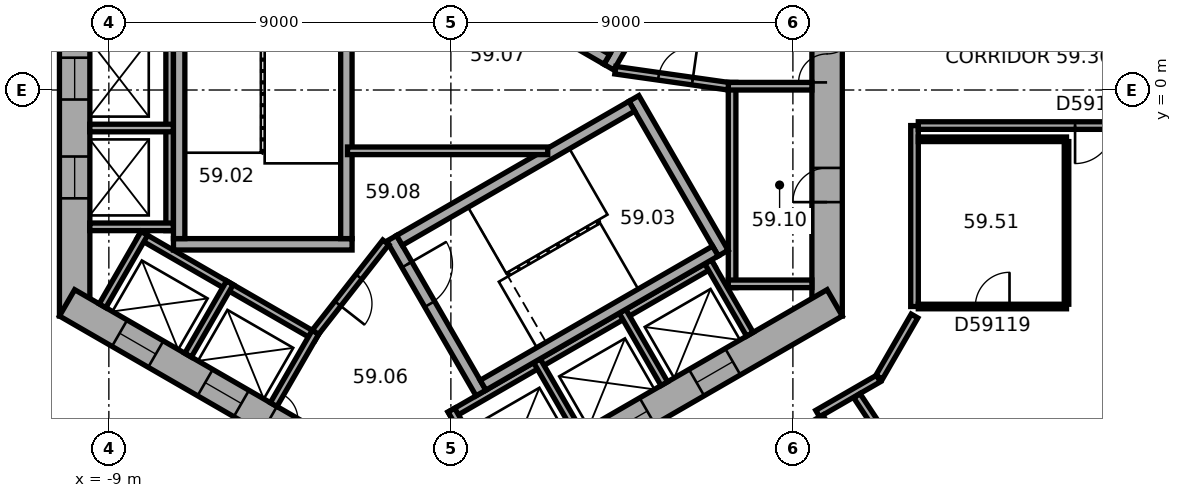
"""IFC4 building model, lengths in metres.
Left out: names, types, materials, properties, quantities, classifications, styles, units other than length and angle.
Written with IfcOpenShell. Run it as: python <this file> out.ifc"""

import sys

from ifc_helpers import new_model, si_unit, direction, frame, frame_2d, origin, place, context, subcontext, project, spatial, rectangle, extrude, element, fill, save


model = new_model("IFC4")
c1 = context("Model", 3, precision=1e-05, world=origin(), true_north=direction((0.0, 1.0)))
c2 = subcontext(c1, "Body", "Model", "MODEL_VIEW")
j1 = project(units=[si_unit("LENGTHUNIT", "METRE"), si_unit("PLANEANGLEUNIT", "RADIAN")], contexts=[c1])
p1 = place(None, origin())
s1 = spatial("IfcSite", under=j1, at=p1, CompositionType="ELEMENT")
p2 = place(p1, origin())
s2 = spatial("IfcBuilding", under=s1, at=p2, CompositionType="ELEMENT")
p3 = place(p2, frame((0.0, 0.0, 240.2)))
s3 = spatial("IfcBuildingStorey", under=s2, at=p3, CompositionType="ELEMENT", Elevation=240.2)
p4 = place(p3, frame((9.9, -5.947, 0.0), z_axis=(0.0, 0.0, 1.0), x_axis=(0.0, 1.0, 0.0)))
e1 = element("IfcWall", 1, at=p4, inside=s3, PredefinedType="SHEAR", context=c2, shape_type="SweptSolid", body=[
    extrude(rectangle(XDim=11.894, YDim=0.8, at=frame_2d((5.947, 0.0))), origin(), (0.0, 0.0, 1.0), 3.7),
])
p5 = place(p4, frame((6.147, 0.0, 0.0)))
e2 = element("IfcOpeningElement", 2, at=p5, cuts=e1, PredefinedType="OPENING", context=c2, shape_type="SweptSolid", body=[
    extrude(rectangle(XDim=1.5, YDim=2.1, at=frame_2d((0.75, 1.05))), frame((0.0, 0.41, 0.0), z_axis=(0.0, -1.0, 0.0), x_axis=(1.0, 0.0, 0.0)), (0.0, 0.0, 1.0), 0.82),
])
p6 = place(p4, frame((2.997, 0.0, 0.0)))
e3 = element("IfcOpeningElement", 3, at=p6, cuts=e1, PredefinedType="OPENING", context=c2, shape_type="SweptSolid", body=[
    extrude(rectangle(XDim=0.9, YDim=2.1, at=frame_2d((0.45, 1.05))), frame((0.0, 0.41, 0.0), z_axis=(0.0, -1.0, 0.0), x_axis=(1.0, 0.0, 0.0)), (0.0, 0.0, 1.0), 0.82),
])
p7 = place(p3, frame((-9.9, 5.947, 0.0), z_axis=(0.0, 0.0, 1.0), x_axis=(0.0, -1.0, 0.0)))
e4 = element("IfcWall", 4, at=p7, inside=s3, PredefinedType="SHEAR", context=c2, shape_type="SweptSolid", body=[
    extrude(rectangle(XDim=11.894, YDim=0.8, at=frame_2d((5.947, 0.0))), origin(), (0.0, 0.0, 1.0), 3.7),
])
p8 = place(p7, frame((5.097, 0.0, 0.0)))
e5 = element("IfcOpeningElement", 5, at=p8, cuts=e4, PredefinedType="OPENING", context=c2, shape_type="SweptSolid", body=[
    extrude(rectangle(XDim=1.1, YDim=2.1, at=frame_2d((0.55, 1.05))), frame((0.0, 0.41, 0.0), z_axis=(0.0, -1.0, 0.0), x_axis=(1.0, 0.0, 0.0)), (0.0, 0.0, 1.0), 0.82),
])
p9 = place(p7, frame((7.697, 0.0, 0.0)))
e6 = element("IfcOpeningElement", 6, at=p9, cuts=e4, PredefinedType="OPENING", context=c2, shape_type="SweptSolid", body=[
    extrude(rectangle(XDim=1.1, YDim=2.1, at=frame_2d((0.55, 1.05))), frame((0.0, 0.41, 0.0), z_axis=(0.0, -1.0, 0.0), x_axis=(1.0, 0.0, 0.0)), (0.0, 0.0, 1.0), 0.82),
])
p10 = place(p3, frame((-10.1, -5.6, 0.0), z_axis=(0.0, 0.0, 1.0), x_axis=(0.866023897231, -0.500002609418, 0.0)))
e7 = element("IfcWall", 7, at=p10, inside=s3, PredefinedType="SHEAR", context=c2, shape_type="SweptSolid", body=[
    extrude(rectangle(XDim=11.894, YDim=0.8, at=frame_2d((5.947, 0.0))), origin(), (0.0, 0.0, 1.0), 3.7),
])
p11 = place(p10, frame((6.147, 0.0, 0.0)))
e8 = element("IfcOpeningElement", 8, at=p11, cuts=e7, PredefinedType="OPENING", context=c2, shape_type="SweptSolid", body=[
    extrude(rectangle(XDim=1.5, YDim=2.1, at=frame_2d((0.75, 1.05))), frame((0.0, 0.41, 0.0), z_axis=(0.0, -1.0, 0.0), x_axis=(1.0, 0.0, 0.0)), (0.0, 0.0, 1.0), 0.82),
])
p12 = place(p10, frame((1.597, 0.0, 0.0)))
e9 = element("IfcOpeningElement", 9, at=p12, cuts=e7, PredefinedType="OPENING", context=c2, shape_type="SweptSolid", body=[
    extrude(rectangle(XDim=1.1, YDim=2.1, at=frame_2d((0.55, 1.05))), frame((0.0, 0.41, 0.0), z_axis=(0.0, -1.0, 0.0), x_axis=(1.0, 0.0, 0.0)), (0.0, 0.0, 1.0), 0.82),
])
p13 = place(p10, frame((4.197, 0.0, 0.0)))
e10 = element("IfcOpeningElement", 10, at=p13, cuts=e7, PredefinedType="OPENING", context=c2, shape_type="SweptSolid", body=[
    extrude(rectangle(XDim=1.1, YDim=2.1, at=frame_2d((0.55, 1.05))), frame((0.0, 0.41, 0.0), z_axis=(0.0, -1.0, 0.0), x_axis=(1.0, 0.0, 0.0)), (0.0, 0.0, 1.0), 0.82),
])
p14 = place(p3, frame((-0.2, -11.547, 0.0), z_axis=(0.0, 0.0, 1.0), x_axis=(0.866023897231, 0.500002609418, 0.0)))
e11 = element("IfcWall", 11, at=p14, inside=s3, PredefinedType="SHEAR", context=c2, shape_type="SweptSolid", body=[
    extrude(rectangle(XDim=11.894, YDim=0.8, at=frame_2d((5.947, 0.0))), origin(), (0.0, 0.0, 1.0), 3.7),
])
p15 = place(p14, frame((2.497, 0.0, 0.0)))
e12 = element("IfcOpeningElement", 12, at=p15, cuts=e11, PredefinedType="OPENING", context=c2, shape_type="SweptSolid", body=[
    extrude(rectangle(XDim=1.1, YDim=2.1, at=frame_2d((0.55, 1.05))), frame((0.0, 0.41, 0.0), z_axis=(0.0, -1.0, 0.0), x_axis=(1.0, 0.0, 0.0)), (0.0, 0.0, 1.0), 0.82),
])
p16 = place(p14, frame((5.097, 0.0, 0.0)))
e13 = element("IfcOpeningElement", 13, at=p16, cuts=e11, PredefinedType="OPENING", context=c2, shape_type="SweptSolid", body=[
    extrude(rectangle(XDim=1.1, YDim=2.1, at=frame_2d((0.55, 1.05))), frame((0.0, 0.41, 0.0), z_axis=(0.0, -1.0, 0.0), x_axis=(1.0, 0.0, 0.0)), (0.0, 0.0, 1.0), 0.82),
])
p17 = place(p14, frame((7.697, 0.0, 0.0)))
e14 = element("IfcOpeningElement", 14, at=p17, cuts=e11, PredefinedType="OPENING", context=c2, shape_type="SweptSolid", body=[
    extrude(rectangle(XDim=1.1, YDim=2.1, at=frame_2d((0.55, 1.05))), frame((0.0, 0.41, 0.0), z_axis=(0.0, -1.0, 0.0), x_axis=(1.0, 0.0, 0.0)), (0.0, 0.0, 1.0), 0.82),
])
p18 = place(p3, frame((7.4, -5.2, 0.0), z_axis=(0.0, 0.0, 1.0), x_axis=(0.0, 1.0, 0.0)))
e15 = element("IfcWall", 15, at=p18, inside=s3, PredefinedType="PARTITIONING", context=c2, shape_type="SweptSolid", body=[
    extrude(rectangle(XDim=5.4, YDim=0.2, at=frame_2d((2.7, 0.0))), origin(), (0.0, 0.0, 1.0), 3.42),
])
for number, where, z_axis, x_axis in (
    (16, (7.3, -5.1, 0.0), (0.0, 0.0, 1.0), (1.0, 0.0, 0.0)),
    (17, (7.3, 0.1, 0.0), (0.0, 0.0, 1.0), (1.0, 0.0, 0.0)),
):
    element("IfcWall", number, at=place(p3, frame(where, z_axis=z_axis, x_axis=x_axis)), inside=s3, PredefinedType="PARTITIONING", context=c2, shape_type="SweptSolid", body=[
        extrude(rectangle(XDim=2.2, YDim=0.2, at=frame_2d((1.1, 0.0))), origin(), (0.0, 0.0, 1.0), 3.42),
    ])
p19 = place(p3, frame((-7.4, 4.3, 0.0), z_axis=(0.0, 0.0, 1.0), x_axis=(0.0, -1.0, 0.0)))
e18 = element("IfcWall", 18, at=p19, inside=s3, PredefinedType="PARTITIONING", context=c2, shape_type="SweptSolid", body=[
    extrude(rectangle(XDim=8.0, YDim=0.2, at=frame_2d((4.0, 0.0))), origin(), (0.0, 0.0, 1.0), 3.42),
])
for number, where, z_axis, x_axis in (
    (19, (-7.3, -1.0, 0.0), (0.0, 0.0, 1.0), (-1.0, 0.0, 0.0)),
    (20, (-7.3, -3.6, 0.0), (0.0, 0.0, 1.0), (-1.0, 0.0, 0.0)),
):
    element("IfcWall", number, at=place(p3, frame(where, z_axis=z_axis, x_axis=x_axis)), inside=s3, PredefinedType="PARTITIONING", context=c2, shape_type="SweptSolid", body=[
        extrude(rectangle(XDim=2.2, YDim=0.2, at=frame_2d((1.1, 0.0))), origin(), (0.0, 0.0, 1.0), 3.42),
    ])
p20 = place(p3, frame((-8.203, -3.809, 0.0), z_axis=(0.0, 0.0, 1.0), x_axis=(0.866028230842, -0.499995103361, 0.0)))
e21 = element("IfcWall", 21, at=p20, inside=s3, PredefinedType="PARTITIONING", context=c2, shape_type="SweptSolid", body=[
    extrude(rectangle(XDim=5.4, YDim=0.2, at=frame_2d((2.7, 0.0))), origin(), (0.0, 0.0, 1.0), 3.42),
])
for number, where, z_axis, x_axis in (
    (22, (-8.067, -3.772, 0.0), (0.0, 0.0, 1.0), (-0.5, -0.866, 0.0)),
    (23, (-5.815, -5.072, 0.0), (0.0, 0.0, 1.0), (-0.5, -0.866, 0.0)),
):
    element("IfcWall", number, at=place(p3, frame(where, z_axis=z_axis, x_axis=x_axis)), inside=s3, PredefinedType="PARTITIONING", context=c2, shape_type="SweptSolid", body=[
        extrude(rectangle(XDim=2.2, YDim=0.2, at=frame_2d((1.1, 0.0))), origin(), (0.0, 0.0, 1.0), 3.42),
    ])
p21 = place(p3, frame((-3.563, -6.372, 0.0), z_axis=(0.0, 0.0, 1.0), x_axis=(-0.499994660107, -0.866028486751, 0.0)))
e24 = element("IfcWall", 24, at=p21, inside=s3, PredefinedType="PARTITIONING", context=c2, shape_type="SweptSolid", body=[
    extrude(rectangle(XDim=2.2, YDim=0.2, at=frame_2d((1.1, 0.0))), origin(), (0.0, 0.0, 1.0), 3.42),
])
p22 = place(p3, frame((-0.024, -8.559, 0.0), z_axis=(0.0, 0.0, 1.0), x_axis=(0.866026010844, 0.49999894854, 0.0)))
e25 = element("IfcWall", 25, at=p22, inside=s3, PredefinedType="PARTITIONING", context=c2, shape_type="SweptSolid", body=[
    extrude(rectangle(XDim=8.0, YDim=0.2, at=frame_2d((4.0, 0.0))), origin(), (0.0, 0.0, 1.0), 3.42),
])
for number, where, z_axis, x_axis in (
    (26, (0.013, -8.422, 0.0), (0.0, 0.0, 1.0), (0.5, -0.866, 0.0)),
    (27, (2.264, -7.122, 0.0), (0.0, 0.0, 1.0), (0.5, -0.866, 0.0)),
    (28, (4.516, -5.822, 0.0), (0.0, 0.0, 1.0), (0.5, -0.866, 0.0)),
    (29, (6.768, -4.522, 0.0), (0.0, 0.0, 1.0), (0.5, -0.866, 0.0)),
):
    element("IfcWall", number, at=place(p3, frame(where, z_axis=z_axis, x_axis=x_axis)), inside=s3, PredefinedType="PARTITIONING", context=c2, shape_type="SweptSolid", body=[
        extrude(rectangle(XDim=2.2, YDim=0.2, at=frame_2d((1.1, 0.0))), origin(), (0.0, 0.0, 1.0), 3.42),
    ])
p23 = place(p3, frame((4.158, 0.602, 0.0), z_axis=(0.0, 0.0, 1.0), x_axis=(0.499977259774, 0.866038532462, 0.0)))
e30 = element("IfcWall", 30, at=p23, inside=s3, PredefinedType="SHEAR", context=c2, shape_type="SweptSolid", body=[
    extrude(rectangle(XDim=4.7, YDim=0.3, at=frame_2d((2.35, 0.0))), origin(), (0.0, 0.0, 1.0), 3.42),
])
p24 = place(p23, frame((0.8, 0.0, 0.0)))
e31 = element("IfcOpeningElement", 31, at=p24, cuts=e30, PredefinedType="OPENING", context=c2, shape_type="SweptSolid", body=[
    extrude(rectangle(XDim=1.2, YDim=2.1, at=frame_2d((0.6, 1.05))), frame((0.0, 0.16, 0.0), z_axis=(0.0, -1.0, 0.0), x_axis=(1.0, 0.0, 0.0)), (0.0, 0.0, 1.0), 0.32),
])
p25 = place(p3, frame((4.103, 0.807, 0.0), z_axis=(0.0, 0.0, 1.0), x_axis=(-0.866027801685, 0.499995846692, 0.0)))
e32 = element("IfcWall", 32, at=p25, inside=s3, PredefinedType="SHEAR", context=c2, shape_type="SweptSolid", body=[
    extrude(rectangle(XDim=7.06, YDim=0.3, at=frame_2d((3.53, 0.0))), origin(), (0.0, 0.0, 1.0), 3.42),
])
p26 = place(p3, frame((-2.6, -4.06, 0.0), z_axis=(0.0, 0.0, 1.0), x_axis=(-1.0, 0.0, 0.0)))
e33 = element("IfcWall", 33, at=p26, inside=s3, PredefinedType="SHEAR", context=c2, shape_type="SweptSolid", body=[
    extrude(rectangle(XDim=4.7, YDim=0.3, at=frame_2d((2.35, 0.0))), origin(), (0.0, 0.0, 1.0), 3.42),
])
for number, where, z_axis, x_axis in (
    (34, (-2.75, 3.15, 0.0), (0.0, 0.0, 1.0), (0.0, -1.0, 0.0)),
    (35, (-7.15, 3.15, 0.0), (0.0, 0.0, 1.0), (0.0, -1.0, 0.0)),
):
    element("IfcWall", number, at=place(p3, frame(where, z_axis=z_axis, x_axis=x_axis)), inside=s3, PredefinedType="SHEAR", context=c2, shape_type="SweptSolid", body=[
        extrude(rectangle(XDim=7.06, YDim=0.3, at=frame_2d((3.53, 0.0))), origin(), (0.0, 0.0, 1.0), 3.42),
    ])
p27 = place(p3, frame((-1.558, -3.902, 0.0), z_axis=(0.0, 0.0, 1.0), x_axis=(0.499977259774, -0.866038532462, 0.0)))
e36 = element("IfcWall", 36, at=p27, inside=s3, PredefinedType="SHEAR", context=c2, shape_type="SweptSolid", body=[
    extrude(rectangle(XDim=4.7, YDim=0.3, at=frame_2d((2.35, 0.0))), origin(), (0.0, 0.0, 1.0), 3.42),
])
p28 = place(p27, frame((0.8, 0.0, 0.0)))
e37 = element("IfcOpeningElement", 37, at=p28, cuts=e36, PredefinedType="OPENING", context=c2, shape_type="SweptSolid", body=[
    extrude(rectangle(XDim=1.2, YDim=2.1, at=frame_2d((0.6, 1.05))), frame((0.0, 0.16, 0.0), z_axis=(0.0, -1.0, 0.0), x_axis=(1.0, 0.0, 0.0)), (0.0, 0.0, 1.0), 0.32),
])
p29 = place(p3, frame((4.816, -0.222, 0.0), z_axis=(0.0, 0.0, 1.0), x_axis=(0.499977259774, -0.866038532462, 0.0)))
e38 = element("IfcWall", 38, at=p29, inside=s3, PredefinedType="SHEAR", context=c2, shape_type="SweptSolid", body=[
    extrude(rectangle(XDim=4.7, YDim=0.3, at=frame_2d((2.35, 0.0))), origin(), (0.0, 0.0, 1.0), 3.42),
])
for number, where, z_axis, x_axis in (
    (39, (-1.353, -3.957, 0.0), (0.0, 0.0, 1.0), (0.866, 0.5, 0.0)),
    (40, (0.847, -7.767, 0.0), (0.0, 0.0, 1.0), (0.866, 0.5, 0.0)),
):
    element("IfcWall", number, at=place(p3, frame(where, z_axis=z_axis, x_axis=x_axis)), inside=s3, PredefinedType="SHEAR", context=c2, shape_type="SweptSolid", body=[
        extrude(rectangle(XDim=7.06, YDim=0.3, at=frame_2d((3.53, 0.0))), origin(), (0.0, 0.0, 1.0), 3.42),
    ])
p30 = place(p3, frame((4.327, 0.521, 0.0), z_axis=(0.0, 0.0, 1.0), x_axis=(0.990124376366, -0.14019172346, 0.0)))
e41 = element("IfcWall", 41, at=p30, inside=s3, PredefinedType="PARTITIONING", context=c2, shape_type="SweptSolid", body=[
    extrude(rectangle(XDim=3.002, YDim=0.2, at=frame_2d((1.501, 0.0))), origin(), (0.0, 0.0, 1.0), 3.42),
])
p31 = place(p30, frame((1.15, 0.0, 0.0)))
e42 = element("IfcOpeningElement", 42, at=p31, cuts=e41, PredefinedType="OPENING", context=c2, shape_type="SweptSolid", body=[
    extrude(rectangle(XDim=0.9, YDim=2.1, at=frame_2d((0.45, 1.05))), frame((0.0, 0.11, 0.0), z_axis=(0.0, -1.0, 0.0), x_axis=(1.0, 0.0, 0.0)), (0.0, 0.0, 1.0), 0.22),
])
p32 = place(p3, frame((-1.712, -4.008, 0.0), z_axis=(0.0, 0.0, 1.0), x_axis=(-0.616549420702, -0.787316208287, 0.0)))
e43 = element("IfcWall", 43, at=p32, inside=s3, PredefinedType="PARTITIONING", context=c2, shape_type="SweptSolid", body=[
    extrude(rectangle(XDim=3.002, YDim=0.2, at=frame_2d((1.501, 0.0))), origin(), (0.0, 0.0, 1.0), 3.42),
])
p33 = place(p32, frame((1.15, 0.0, 0.0)))
e44 = element("IfcOpeningElement", 44, at=p33, cuts=e43, PredefinedType="OPENING", context=c2, shape_type="SweptSolid", body=[
    extrude(rectangle(XDim=0.9, YDim=2.1, at=frame_2d((0.45, 1.05))), frame((0.0, 0.11, 0.0), z_axis=(0.0, -1.0, 0.0), x_axis=(1.0, 0.0, 0.0)), (0.0, 0.0, 1.0), 0.22),
])
p34 = place(p3, frame((-2.72, -1.6, 0.0), z_axis=(0.0, 0.0, 1.0), x_axis=(1.0, 0.0, 0.0)))
e45 = element("IfcWall", 45, at=p34, inside=s3, PredefinedType="PARTITIONING", context=c2, shape_type="SweptSolid", body=[
    extrude(rectangle(XDim=5.269, YDim=0.2, at=frame_2d((2.634, 0.0))), origin(), (0.0, 0.0, 1.0), 3.42),
])
p35 = place(p3, frame((9.652, -8.515, 0.0), z_axis=(0.0, 0.0, 1.0), x_axis=(0.866020375458, 0.500008709215, 0.0)))
e46 = element("IfcWall", 46, at=p35, inside=s3, PredefinedType="PARTITIONING", context=c2, shape_type="SweptSolid", body=[
    extrude(rectangle(XDim=1.846, YDim=0.2, at=frame_2d((0.923, 0.0))), origin(), (0.0, 0.0, 1.0), 3.42),
])
p36 = place(p3, frame((10.202, -9.469, 0.0), z_axis=(0.0, 0.0, 1.0), x_axis=(-0.499968756647, 0.866043441391, 0.0)))
e47 = element("IfcWall", 47, at=p36, inside=s3, PredefinedType="PARTITIONING", context=c2, shape_type="SweptSolid", body=[
    extrude(rectangle(XDim=1.001, YDim=0.2, at=frame_2d((0.5, 0.0))), origin(), (0.0, 0.0, 1.0), 3.42),
])
p37 = place(p3, frame((11.27, -7.558, 0.0), z_axis=(0.0, 0.0, 1.0), x_axis=(0.499964847546, 0.866045698112, 0.0)))
e48 = element("IfcWall", 48, at=p37, inside=s3, PredefinedType="PARTITIONING", context=c2, shape_type="SweptSolid", body=[
    extrude(rectangle(XDim=1.86, YDim=0.2, at=frame_2d((0.93, 0.0))), origin(), (0.0, 0.0, 1.0), 3.42),
])
p38 = place(p3, frame((12.2, -5.697, 0.0), z_axis=(0.0, 0.0, 1.0), x_axis=(0.0, 1.0, 0.0)))
e49 = element("IfcWall", 49, at=p38, inside=s3, PredefinedType="PARTITIONING", context=c2, shape_type="SweptSolid", body=[
    extrude(rectangle(XDim=4.761, YDim=0.2, at=frame_2d((2.381, 0.0))), origin(), (0.0, 0.0, 1.0), 3.42),
])
p39 = place(p3, frame((12.3, -1.297, 0.0), z_axis=(0.0, 0.0, 1.0), x_axis=(1.0, 0.0, 0.0)))
e50 = element("IfcWall", 50, at=p39, inside=s3, PredefinedType="PARTITIONING", context=c2, shape_type="SweptSolid", body=[
    extrude(rectangle(XDim=3.9, YDim=0.12, at=frame_2d((1.95, 0.0))), origin(), (0.0, 0.0, 1.0), 3.42),
])
p40 = place(p3, frame((12.3, -0.936, 0.0), z_axis=(0.0, 0.0, 1.0), x_axis=(1.0, 0.0, 0.0)))
e51 = element("IfcWall", 51, at=p40, inside=s3, PredefinedType="PARTITIONING", context=c2, shape_type="SweptSolid", body=[
    extrude(rectangle(XDim=7.25, YDim=0.2, at=frame_2d((3.625, 0.0))), origin(), (0.0, 0.0, 1.0), 2.87),
])
p41 = place(p40, frame((4.125, 0.0, 0.0)))
e52 = element("IfcOpeningElement", 52, at=p41, cuts=e51, PredefinedType="OPENING", context=c2, shape_type="SweptSolid", body=[
    extrude(rectangle(XDim=1.0, YDim=2.1, at=frame_2d((0.5, 1.05))), frame((0.0, 0.11, 0.0), z_axis=(0.0, -1.0, 0.0), x_axis=(1.0, 0.0, 0.0)), (0.0, 0.0, 1.0), 0.22),
])
p42 = place(p3, frame((14.517, -13.836, 0.0), z_axis=(0.0, 0.0, 1.0), x_axis=(-0.551938455794, 0.833884848775, 0.0)))
e53 = element("IfcWall", 53, at=p42, inside=s3, PredefinedType="PARTITIONING", context=c2, shape_type="SweptSolid", body=[
    extrude(rectangle(XDim=6.944, YDim=0.2, at=frame_2d((3.472, 0.0))), origin(), (0.0, 0.0, 1.0), 2.87),
])
p43 = place(p3, frame((16.2, -5.697, 0.0), z_axis=(0.0, 0.0, 1.0), x_axis=(-1.0, 0.0, 0.0)))
e54 = element("IfcWall", 54, at=p43, inside=s3, PredefinedType="PARTITIONING", context=c2, shape_type="SweptSolid", body=[
    extrude(rectangle(XDim=3.9, YDim=0.12, at=frame_2d((1.95, 0.0))), origin(), (0.0, 0.0, 1.0), 3.42),
])
p44 = place(p43, frame((1.5, 0.0, 0.0)))
e55 = element("IfcOpeningElement", 55, at=p44, cuts=e54, PredefinedType="OPENING", context=c2, shape_type="SweptSolid", body=[
    extrude(rectangle(XDim=0.9, YDim=2.1, at=frame_2d((0.45, 1.05))), frame((0.0, 0.07, 0.0), z_axis=(0.0, -1.0, 0.0), x_axis=(1.0, 0.0, 0.0)), (0.0, 0.0, 1.0), 0.14),
])
p45 = place(p3, frame((16.2, -1.357, 0.0), z_axis=(0.0, 0.0, 1.0), x_axis=(0.0, -1.0, 0.0)))
e56 = element("IfcWall", 56, at=p45, inside=s3, PredefinedType="PARTITIONING", context=c2, shape_type="SweptSolid", body=[
    extrude(rectangle(XDim=4.28, YDim=0.12, at=frame_2d((2.14, 0.0))), origin(), (0.0, 0.0, 1.0), 3.42),
])
p46 = place(p5, origin())
e57 = element("IfcDoor", 57, at=p46, inside=s3, OperationType="DOUBLE_DOOR_SINGLE_SWING", PredefinedType="DOOR", context=c2, shape_type="SweptSolid", body=[
    extrude(rectangle(XDim=1.5, YDim=2.1, at=frame_2d((0.75, 1.05))), frame((0.0, 0.025, 0.0), z_axis=(0.0, -1.0, 0.0), x_axis=(1.0, 0.0, 0.0)), (0.0, 0.0, 1.0), 0.05),
])
fill(e2, e57)
p47 = place(p28, origin())
e58 = element("IfcDoor", 58, at=p47, inside=s3, OperationType="SINGLE_SWING_RIGHT", PredefinedType="DOOR", context=c2, shape_type="SweptSolid", body=[
    extrude(rectangle(XDim=1.2, YDim=2.1, at=frame_2d((0.6, 1.05))), frame((0.0, 0.025, 0.0), z_axis=(0.0, -1.0, 0.0), x_axis=(1.0, 0.0, 0.0)), (0.0, 0.0, 1.0), 0.05),
])
fill(e37, e58)
p48 = place(p31, origin())
e59 = element("IfcDoor", 59, at=p48, inside=s3, OperationType="SINGLE_SWING_LEFT", PredefinedType="DOOR", context=c2, shape_type="SweptSolid", body=[
    extrude(rectangle(XDim=0.9, YDim=2.1, at=frame_2d((0.45, 1.05))), frame((0.0, 0.025, 0.0), z_axis=(0.0, -1.0, 0.0), x_axis=(1.0, 0.0, 0.0)), (0.0, 0.0, 1.0), 0.05),
])
fill(e42, e59)
p49 = place(p33, origin())
e60 = element("IfcDoor", 60, at=p49, inside=s3, OperationType="SINGLE_SWING_LEFT", PredefinedType="DOOR", context=c2, shape_type="SweptSolid", body=[
    extrude(rectangle(XDim=0.9, YDim=2.1, at=frame_2d((0.45, 1.05))), frame((0.0, 0.025, 0.0), z_axis=(0.0, -1.0, 0.0), x_axis=(1.0, 0.0, 0.0)), (0.0, 0.0, 1.0), 0.05),
])
fill(e44, e60)
p50 = place(p6, origin())
e61 = element("IfcDoor", 61, at=p50, inside=s3, OperationType="SINGLE_SWING_LEFT", PredefinedType="DOOR", context=c2, shape_type="SweptSolid", body=[
    extrude(rectangle(XDim=0.9, YDim=2.1, at=frame_2d((0.45, 1.05))), frame((0.0, 0.025, 0.0), z_axis=(0.0, -1.0, 0.0), x_axis=(1.0, 0.0, 0.0)), (0.0, 0.0, 1.0), 0.05),
])
fill(e3, e61)
p51 = place(p8, origin())
e62 = element("IfcDoor", 62, at=p51, inside=s3, OperationType="DOUBLE_DOOR_SLIDING", PredefinedType="DOOR", context=c2, shape_type="SweptSolid", body=[
    extrude(rectangle(XDim=1.1, YDim=2.1, at=frame_2d((0.55, 1.05))), frame((0.0, 0.025, 0.0), z_axis=(0.0, -1.0, 0.0), x_axis=(1.0, 0.0, 0.0)), (0.0, 0.0, 1.0), 0.05),
])
fill(e5, e62)
p52 = place(p9, origin())
e63 = element("IfcDoor", 63, at=p52, inside=s3, OperationType="DOUBLE_DOOR_SLIDING", PredefinedType="DOOR", context=c2, shape_type="SweptSolid", body=[
    extrude(rectangle(XDim=1.1, YDim=2.1, at=frame_2d((0.55, 1.05))), frame((0.0, 0.025, 0.0), z_axis=(0.0, -1.0, 0.0), x_axis=(1.0, 0.0, 0.0)), (0.0, 0.0, 1.0), 0.05),
])
fill(e6, e63)
p53 = place(p12, origin())
e64 = element("IfcDoor", 64, at=p53, inside=s3, OperationType="DOUBLE_DOOR_SLIDING", PredefinedType="DOOR", context=c2, shape_type="SweptSolid", body=[
    extrude(rectangle(XDim=1.1, YDim=2.1, at=frame_2d((0.55, 1.05))), frame((0.0, 0.025, 0.0), z_axis=(0.0, -1.0, 0.0), x_axis=(1.0, 0.0, 0.0)), (0.0, 0.0, 1.0), 0.05),
])
fill(e9, e64)
p54 = place(p13, origin())
e65 = element("IfcDoor", 65, at=p54, inside=s3, OperationType="DOUBLE_DOOR_SLIDING", PredefinedType="DOOR", context=c2, shape_type="SweptSolid", body=[
    extrude(rectangle(XDim=1.1, YDim=2.1, at=frame_2d((0.55, 1.05))), frame((0.0, 0.025, 0.0), z_axis=(0.0, -1.0, 0.0), x_axis=(1.0, 0.0, 0.0)), (0.0, 0.0, 1.0), 0.05),
])
fill(e10, e65)
p55 = place(p16, origin())
e66 = element("IfcDoor", 66, at=p55, inside=s3, OperationType="DOUBLE_DOOR_SLIDING", PredefinedType="DOOR", context=c2, shape_type="SweptSolid", body=[
    extrude(rectangle(XDim=1.1, YDim=2.1, at=frame_2d((0.55, 1.05))), frame((0.0, 0.025, 0.0), z_axis=(0.0, -1.0, 0.0), x_axis=(1.0, 0.0, 0.0)), (0.0, 0.0, 1.0), 0.05),
])
fill(e13, e66)
p56 = place(p17, origin())
e67 = element("IfcDoor", 67, at=p56, inside=s3, OperationType="DOUBLE_DOOR_SLIDING", PredefinedType="DOOR", context=c2, shape_type="SweptSolid", body=[
    extrude(rectangle(XDim=1.1, YDim=2.1, at=frame_2d((0.55, 1.05))), frame((0.0, 0.025, 0.0), z_axis=(0.0, -1.0, 0.0), x_axis=(1.0, 0.0, 0.0)), (0.0, 0.0, 1.0), 0.05),
])
fill(e14, e67)
p57 = place(p41, origin())
e68 = element("IfcDoor", 68, at=p57, inside=s3, OperationType="SINGLE_SWING_LEFT", PredefinedType="DOOR", context=c2, shape_type="SweptSolid", body=[
    extrude(rectangle(XDim=1.0, YDim=2.1, at=frame_2d((0.5, 1.05))), frame((0.0, 0.025, 0.0), z_axis=(0.0, -1.0, 0.0), x_axis=(1.0, 0.0, 0.0)), (0.0, 0.0, 1.0), 0.05),
])
fill(e52, e68)
p58 = place(p44, origin())
e69 = element("IfcDoor", 69, at=p58, inside=s3, OperationType="SINGLE_SWING_LEFT", PredefinedType="DOOR", context=c2, shape_type="SweptSolid", body=[
    extrude(rectangle(XDim=0.9, YDim=2.1, at=frame_2d((0.45, 1.05))), frame((0.0, 0.025, 0.0), z_axis=(0.0, -1.0, 0.0), x_axis=(1.0, 0.0, 0.0)), (0.0, 0.0, 1.0), 0.05),
])
fill(e55, e69)
save(model, sys.argv[1])
